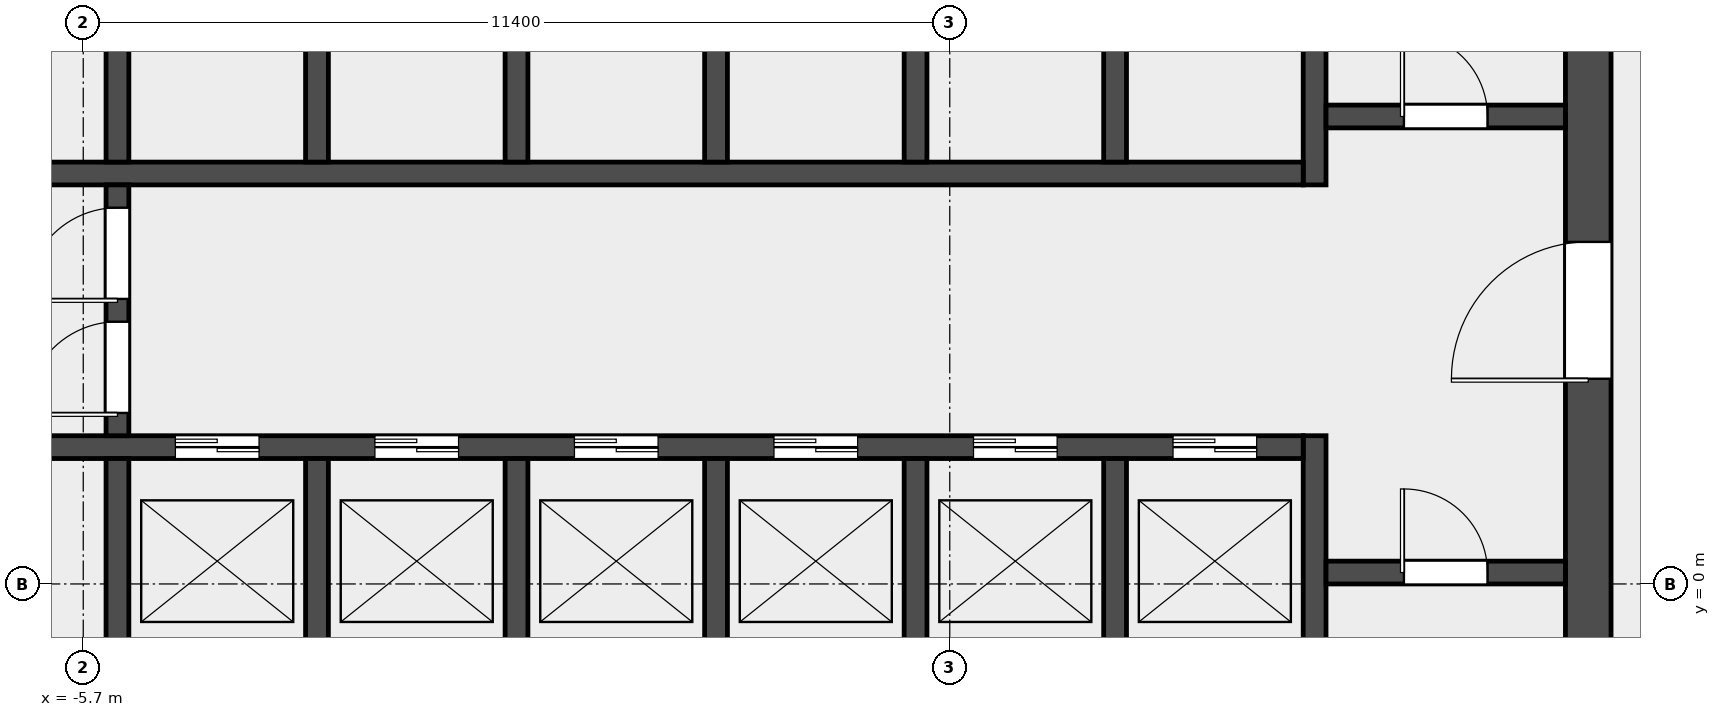
"""IFC4 building model, lengths in metres.
Left out: names, types, materials, properties, quantities, classifications, styles, units other than length and angle.
Written with IfcOpenShell. Run it as: python <this file> out.ifc"""

import sys

from ifc_helpers import new_model, si_unit, direction, frame, frame_2d, origin, place, context, subcontext, project, spatial, rectangle, extrude, element, fill, save


model = new_model("IFC4")
c1 = context("Model", 3, precision=1e-05, world=origin(), true_north=direction((0.0, 1.0)))
c2 = subcontext(c1, "Body", "Model", "MODEL_VIEW")
j1 = project(units=[si_unit("LENGTHUNIT", "METRE"), si_unit("PLANEANGLEUNIT", "RADIAN")], contexts=[c1])
p1 = place(None, origin())
s1 = spatial("IfcSite", under=j1, at=p1, CompositionType="ELEMENT")
p2 = place(p1, origin())
s2 = spatial("IfcBuilding", under=s1, at=p2, CompositionType="ELEMENT")
p3 = place(p2, frame((0.0, 0.0, 173.0)))
s3 = spatial("IfcBuildingStorey", under=s2, at=p3, CompositionType="ELEMENT", Elevation=173.0)
p4 = place(p3, frame((14.1, -6.6, 0.0), z_axis=(0.0, 0.0, 1.0), x_axis=(0.0, 1.0, 0.0)))
e1 = element("IfcWall", 1, at=p4, inside=s3, PredefinedType="SHEAR", context=c2, shape_type="SweptSolid", body=[
    extrude(rectangle(XDim=19.5, YDim=0.6, at=frame_2d((9.75, 0.0))), origin(), (0.0, 0.0, 1.0), 3.7),
])
p5 = place(p4, frame((9.3, 0.0, 0.0)))
e2 = element("IfcOpeningElement", 2, at=p5, cuts=e1, PredefinedType="OPENING", context=c2, shape_type="SweptSolid", body=[
    extrude(rectangle(XDim=1.8, YDim=2.1, at=frame_2d((0.9, 1.05))), frame((0.0, 0.312, 0.0), z_axis=(0.0, -1.0, 0.0), x_axis=(1.0, 0.0, 0.0)), (0.0, 0.0, 1.0), 0.624),
])
p6 = place(p3, frame((10.5, -6.6, 0.0), z_axis=(0.0, 0.0, 1.0), x_axis=(0.0, 1.0, 0.0)))
e3 = element("IfcWall", 3, at=p6, inside=s3, PredefinedType="SHEAR", context=c2, shape_type="SweptSolid", body=[
    extrude(rectangle(XDim=8.55, YDim=0.3, at=frame_2d((4.275, 0.0))), origin(), (0.0, 0.0, 1.0), 3.7),
])
p7 = place(p3, frame((10.5, 5.25, 0.0), z_axis=(0.0, 0.0, 1.0), x_axis=(0.0, 1.0, 0.0)))
e4 = element("IfcWall", 4, at=p7, inside=s3, PredefinedType="SHEAR", context=c2, shape_type="SweptSolid", body=[
    extrude(rectangle(XDim=7.65, YDim=0.3, at=frame_2d((3.825, 0.0))), origin(), (0.0, 0.0, 1.0), 3.7),
])
p8 = place(p3, frame((10.65, 0.15, 0.0), z_axis=(0.0, 0.0, 1.0), x_axis=(1.0, 0.0, 0.0)))
e5 = element("IfcWall", 5, at=p8, inside=s3, PredefinedType="SOLIDWALL", context=c2, shape_type="SweptSolid", body=[
    extrude(rectangle(XDim=3.15, YDim=0.3, at=frame_2d((1.575, 0.0))), origin(), (0.0, 0.0, 1.0), 3.7),
])
p9 = place(p8, frame((1.025, 0.0, 0.0)))
e6 = element("IfcOpeningElement", 6, at=p9, cuts=e5, PredefinedType="OPENING", context=c2, shape_type="SweptSolid", body=[
    extrude(rectangle(XDim=1.1, YDim=2.1, at=frame_2d((0.55, 1.05))), frame((0.0, 0.162, 0.0), z_axis=(0.0, -1.0, 0.0), x_axis=(1.0, 0.0, 0.0)), (0.0, 0.0, 1.0), 0.324),
])
p10 = place(p3, frame((10.65, 6.15, 0.0), z_axis=(0.0, 0.0, 1.0), x_axis=(1.0, 0.0, 0.0)))
e7 = element("IfcWall", 7, at=p10, inside=s3, PredefinedType="SOLIDWALL", context=c2, shape_type="SweptSolid", body=[
    extrude(rectangle(XDim=3.15, YDim=0.3, at=frame_2d((1.575, 0.0))), origin(), (0.0, 0.0, 1.0), 3.7),
])
p11 = place(p10, frame((1.025, 0.0, 0.0)))
e8 = element("IfcOpeningElement", 8, at=p11, cuts=e7, PredefinedType="OPENING", context=c2, shape_type="SweptSolid", body=[
    extrude(rectangle(XDim=1.1, YDim=2.1, at=frame_2d((0.55, 1.05))), frame((0.0, 0.162, 0.0), z_axis=(0.0, -1.0, 0.0), x_axis=(1.0, 0.0, 0.0)), (0.0, 0.0, 1.0), 0.324),
])
p12 = place(p3, frame((-10.35, 1.8, 0.0), z_axis=(0.0, 0.0, 1.0), x_axis=(1.0, 0.0, 0.0)))
e9 = element("IfcWall", 9, at=p12, inside=s3, PredefinedType="SOLIDWALL", context=c2, shape_type="SweptSolid", body=[
    extrude(rectangle(XDim=20.7, YDim=0.3, at=frame_2d((10.35, 0.0))), origin(), (0.0, 0.0, 1.0), 3.7),
])
p13 = place(p12, frame((0.512, 0.0, 0.0)))
e10 = element("IfcOpeningElement", 10, at=p13, cuts=e9, PredefinedType="OPENING", context=c2, shape_type="SweptSolid", body=[
    extrude(rectangle(XDim=1.3, YDim=2.1, at=frame_2d((0.65, 1.05))), frame((0.0, 0.162, 0.0), z_axis=(0.0, -1.0, 0.0), x_axis=(1.0, 0.0, 0.0)), (0.0, 0.0, 1.0), 0.324),
])
p14 = place(p12, frame((5.863, 0.0, 0.0)))
e11 = element("IfcOpeningElement", 11, at=p14, cuts=e9, PredefinedType="OPENING", context=c2, shape_type="SweptSolid", body=[
    extrude(rectangle(XDim=1.1, YDim=2.1, at=frame_2d((0.55, 1.05))), frame((0.0, 0.162, 0.0), z_axis=(0.0, -1.0, 0.0), x_axis=(1.0, 0.0, 0.0)), (0.0, 0.0, 1.0), 0.324),
])
p15 = place(p12, frame((8.488, 0.0, 0.0)))
e12 = element("IfcOpeningElement", 12, at=p15, cuts=e9, PredefinedType="OPENING", context=c2, shape_type="SweptSolid", body=[
    extrude(rectangle(XDim=1.1, YDim=2.1, at=frame_2d((0.55, 1.05))), frame((0.0, 0.162, 0.0), z_axis=(0.0, -1.0, 0.0), x_axis=(1.0, 0.0, 0.0)), (0.0, 0.0, 1.0), 0.324),
])
p16 = place(p12, frame((11.113, 0.0, 0.0)))
e13 = element("IfcOpeningElement", 13, at=p16, cuts=e9, PredefinedType="OPENING", context=c2, shape_type="SweptSolid", body=[
    extrude(rectangle(XDim=1.1, YDim=2.1, at=frame_2d((0.55, 1.05))), frame((0.0, 0.162, 0.0), z_axis=(0.0, -1.0, 0.0), x_axis=(1.0, 0.0, 0.0)), (0.0, 0.0, 1.0), 0.324),
])
p17 = place(p12, frame((13.738, 0.0, 0.0)))
e14 = element("IfcOpeningElement", 14, at=p17, cuts=e9, PredefinedType="OPENING", context=c2, shape_type="SweptSolid", body=[
    extrude(rectangle(XDim=1.1, YDim=2.1, at=frame_2d((0.55, 1.05))), frame((0.0, 0.162, 0.0), z_axis=(0.0, -1.0, 0.0), x_axis=(1.0, 0.0, 0.0)), (0.0, 0.0, 1.0), 0.324),
])
p18 = place(p12, frame((16.363, 0.0, 0.0)))
e15 = element("IfcOpeningElement", 15, at=p18, cuts=e9, PredefinedType="OPENING", context=c2, shape_type="SweptSolid", body=[
    extrude(rectangle(XDim=1.1, YDim=2.1, at=frame_2d((0.55, 1.05))), frame((0.0, 0.162, 0.0), z_axis=(0.0, -1.0, 0.0), x_axis=(1.0, 0.0, 0.0)), (0.0, 0.0, 1.0), 0.324),
])
p19 = place(p12, frame((18.988, 0.0, 0.0)))
e16 = element("IfcOpeningElement", 16, at=p19, cuts=e9, PredefinedType="OPENING", context=c2, shape_type="SweptSolid", body=[
    extrude(rectangle(XDim=1.1, YDim=2.1, at=frame_2d((0.55, 1.05))), frame((0.0, 0.162, 0.0), z_axis=(0.0, -1.0, 0.0), x_axis=(1.0, 0.0, 0.0)), (0.0, 0.0, 1.0), 0.324),
])
p20 = place(p3, frame((-10.35, 5.4, 0.0), z_axis=(0.0, 0.0, 1.0), x_axis=(1.0, 0.0, 0.0)))
e17 = element("IfcWall", 17, at=p20, inside=s3, PredefinedType="SOLIDWALL", context=c2, shape_type="SweptSolid", body=[
    extrude(rectangle(XDim=20.7, YDim=0.3, at=frame_2d((10.35, 0.0))), origin(), (0.0, 0.0, 1.0), 3.7),
])
p21 = place(p20, frame((0.512, 0.0, 0.0)))
e18 = element("IfcOpeningElement", 18, at=p21, cuts=e17, PredefinedType="OPENING", context=c2, shape_type="SweptSolid", body=[
    extrude(rectangle(XDim=1.3, YDim=2.1, at=frame_2d((0.65, 1.05))), frame((0.0, 0.162, 0.0), z_axis=(0.0, -1.0, 0.0), x_axis=(1.0, 0.0, 0.0)), (0.0, 0.0, 1.0), 0.324),
])
for number, where, z_axis, x_axis in (
    (19, (-5.25, -1.05, 0.0), (0.0, 0.0, 1.0), (0.0, 1.0, 0.0)),
    (20, (-2.625, -1.05, 0.0), (0.0, 0.0, 1.0), (0.0, 1.0, 0.0)),
    (21, (0.0, -1.05, 0.0), (0.0, 0.0, 1.0), (0.0, 1.0, 0.0)),
    (22, (2.625, -1.05, 0.0), (0.0, 0.0, 1.0), (0.0, 1.0, 0.0)),
    (23, (5.25, -1.05, 0.0), (0.0, 0.0, 1.0), (0.0, 1.0, 0.0)),
    (24, (7.875, -1.05, 0.0), (0.0, 0.0, 1.0), (0.0, 1.0, 0.0)),
    (25, (-5.25, 5.55, 0.0), (0.0, 0.0, 1.0), (0.0, 1.0, 0.0)),
    (26, (-2.625, 5.55, 0.0), (0.0, 0.0, 1.0), (0.0, 1.0, 0.0)),
    (27, (0.0, 5.55, 0.0), (0.0, 0.0, 1.0), (0.0, 1.0, 0.0)),
    (28, (2.625, 5.55, 0.0), (0.0, 0.0, 1.0), (0.0, 1.0, 0.0)),
    (29, (5.25, 5.55, 0.0), (0.0, 0.0, 1.0), (0.0, 1.0, 0.0)),
    (30, (7.875, 5.55, 0.0), (0.0, 0.0, 1.0), (0.0, 1.0, 0.0)),
):
    element("IfcWall", number, at=place(p3, frame(where, z_axis=z_axis, x_axis=x_axis)), inside=s3, PredefinedType="SOLIDWALL", context=c2, shape_type="SweptSolid", body=[
        extrude(rectangle(XDim=2.7, YDim=0.3, at=frame_2d((1.35, 0.0))), origin(), (0.0, 0.0, 1.0), 3.7),
    ])
p22 = place(p3, frame((-5.25, 1.95, 0.0), z_axis=(0.0, 0.0, 1.0), x_axis=(0.0, 1.0, 0.0)))
e31 = element("IfcWall", 31, at=p22, inside=s3, PredefinedType="SOLIDWALL", context=c2, shape_type="SweptSolid", body=[
    extrude(rectangle(XDim=3.3, YDim=0.3, at=frame_2d((1.65, 0.0))), origin(), (0.0, 0.0, 1.0), 3.7),
])
p23 = place(p22, frame((0.3, 0.0, 0.0)))
e32 = element("IfcOpeningElement", 32, at=p23, cuts=e31, PredefinedType="OPENING", context=c2, shape_type="SweptSolid", body=[
    extrude(rectangle(XDim=1.2, YDim=2.1, at=frame_2d((0.6, 1.05))), frame((0.0, 0.162, 0.0), z_axis=(0.0, -1.0, 0.0), x_axis=(1.0, 0.0, 0.0)), (0.0, 0.0, 1.0), 0.324),
])
p24 = place(p22, frame((1.8, 0.0, 0.0)))
e33 = element("IfcOpeningElement", 33, at=p24, cuts=e31, PredefinedType="OPENING", context=c2, shape_type="SweptSolid", body=[
    extrude(rectangle(XDim=1.2, YDim=2.1, at=frame_2d((0.6, 1.05))), frame((0.0, 0.162, 0.0), z_axis=(0.0, -1.0, 0.0), x_axis=(1.0, 0.0, 0.0)), (0.0, 0.0, 1.0), 0.324),
])
p25 = place(p9, origin())
e34 = element("IfcDoor", 34, at=p25, inside=s3, OperationType="SINGLE_SWING_RIGHT", PredefinedType="DOOR", context=c2, shape_type="SweptSolid", body=[
    extrude(rectangle(XDim=1.1, YDim=2.1, at=frame_2d((0.55, 1.05))), frame((0.0, 0.025, 0.0), z_axis=(0.0, -1.0, 0.0), x_axis=(1.0, 0.0, 0.0)), (0.0, 0.0, 1.0), 0.05),
])
fill(e6, e34)
p26 = place(p11, origin())
e35 = element("IfcDoor", 35, at=p26, inside=s3, OperationType="SINGLE_SWING_RIGHT", PredefinedType="DOOR", context=c2, shape_type="SweptSolid", body=[
    extrude(rectangle(XDim=1.1, YDim=2.1, at=frame_2d((0.55, 1.05))), frame((0.0, 0.025, 0.0), z_axis=(0.0, -1.0, 0.0), x_axis=(1.0, 0.0, 0.0)), (0.0, 0.0, 1.0), 0.05),
])
fill(e8, e35)
p27 = place(p5, origin())
e36 = element("IfcDoor", 36, at=p27, inside=s3, OperationType="DOUBLE_DOOR_SINGLE_SWING", PredefinedType="DOOR", context=c2, shape_type="SweptSolid", body=[
    extrude(rectangle(XDim=1.8, YDim=2.1, at=frame_2d((0.9, 1.05))), frame((0.0, 0.025, 0.0), z_axis=(0.0, -1.0, 0.0), x_axis=(1.0, 0.0, 0.0)), (0.0, 0.0, 1.0), 0.05),
])
fill(e2, e36)
p28 = place(p23, origin())
e37 = element("IfcDoor", 37, at=p28, inside=s3, OperationType="SINGLE_SWING_LEFT", PredefinedType="DOOR", context=c2, shape_type="SweptSolid", body=[
    extrude(rectangle(XDim=1.2, YDim=2.1, at=frame_2d((0.6, 1.05))), frame((0.0, 0.025, 0.0), z_axis=(0.0, -1.0, 0.0), x_axis=(1.0, 0.0, 0.0)), (0.0, 0.0, 1.0), 0.05),
])
fill(e32, e37)
p29 = place(p24, origin())
e38 = element("IfcDoor", 38, at=p29, inside=s3, OperationType="SINGLE_SWING_RIGHT", PredefinedType="DOOR", context=c2, shape_type="SweptSolid", body=[
    extrude(rectangle(XDim=1.2, YDim=2.1, at=frame_2d((0.6, 1.05))), frame((0.0, 0.025, 0.0), z_axis=(0.0, -1.0, 0.0), x_axis=(1.0, 0.0, 0.0)), (0.0, 0.0, 1.0), 0.05),
])
fill(e33, e38)
p30 = place(p14, origin())
e39 = element("IfcDoor", 39, at=p30, inside=s3, OperationType="DOUBLE_DOOR_SLIDING", PredefinedType="DOOR", context=c2, shape_type="SweptSolid", body=[
    extrude(rectangle(XDim=1.1, YDim=2.1, at=frame_2d((0.55, 1.05))), frame((0.0, 0.025, 0.0), z_axis=(0.0, -1.0, 0.0), x_axis=(1.0, 0.0, 0.0)), (0.0, 0.0, 1.0), 0.05),
])
fill(e11, e39)
p31 = place(p15, origin())
e40 = element("IfcDoor", 40, at=p31, inside=s3, OperationType="DOUBLE_DOOR_SLIDING", PredefinedType="DOOR", context=c2, shape_type="SweptSolid", body=[
    extrude(rectangle(XDim=1.1, YDim=2.1, at=frame_2d((0.55, 1.05))), frame((0.0, 0.025, 0.0), z_axis=(0.0, -1.0, 0.0), x_axis=(1.0, 0.0, 0.0)), (0.0, 0.0, 1.0), 0.05),
])
fill(e12, e40)
p32 = place(p16, origin())
e41 = element("IfcDoor", 41, at=p32, inside=s3, OperationType="DOUBLE_DOOR_SLIDING", PredefinedType="DOOR", context=c2, shape_type="SweptSolid", body=[
    extrude(rectangle(XDim=1.1, YDim=2.1, at=frame_2d((0.55, 1.05))), frame((0.0, 0.025, 0.0), z_axis=(0.0, -1.0, 0.0), x_axis=(1.0, 0.0, 0.0)), (0.0, 0.0, 1.0), 0.05),
])
fill(e13, e41)
p33 = place(p17, origin())
e42 = element("IfcDoor", 42, at=p33, inside=s3, OperationType="DOUBLE_DOOR_SLIDING", PredefinedType="DOOR", context=c2, shape_type="SweptSolid", body=[
    extrude(rectangle(XDim=1.1, YDim=2.1, at=frame_2d((0.55, 1.05))), frame((0.0, 0.025, 0.0), z_axis=(0.0, -1.0, 0.0), x_axis=(1.0, 0.0, 0.0)), (0.0, 0.0, 1.0), 0.05),
])
fill(e14, e42)
p34 = place(p18, origin())
e43 = element("IfcDoor", 43, at=p34, inside=s3, OperationType="DOUBLE_DOOR_SLIDING", PredefinedType="DOOR", context=c2, shape_type="SweptSolid", body=[
    extrude(rectangle(XDim=1.1, YDim=2.1, at=frame_2d((0.55, 1.05))), frame((0.0, 0.025, 0.0), z_axis=(0.0, -1.0, 0.0), x_axis=(1.0, 0.0, 0.0)), (0.0, 0.0, 1.0), 0.05),
])
fill(e15, e43)
p35 = place(p19, origin())
e44 = element("IfcDoor", 44, at=p35, inside=s3, OperationType="DOUBLE_DOOR_SLIDING", PredefinedType="DOOR", context=c2, shape_type="SweptSolid", body=[
    extrude(rectangle(XDim=1.1, YDim=2.1, at=frame_2d((0.55, 1.05))), frame((0.0, 0.025, 0.0), z_axis=(0.0, -1.0, 0.0), x_axis=(1.0, 0.0, 0.0)), (0.0, 0.0, 1.0), 0.05),
])
fill(e16, e44)
save(model, sys.argv[1])
